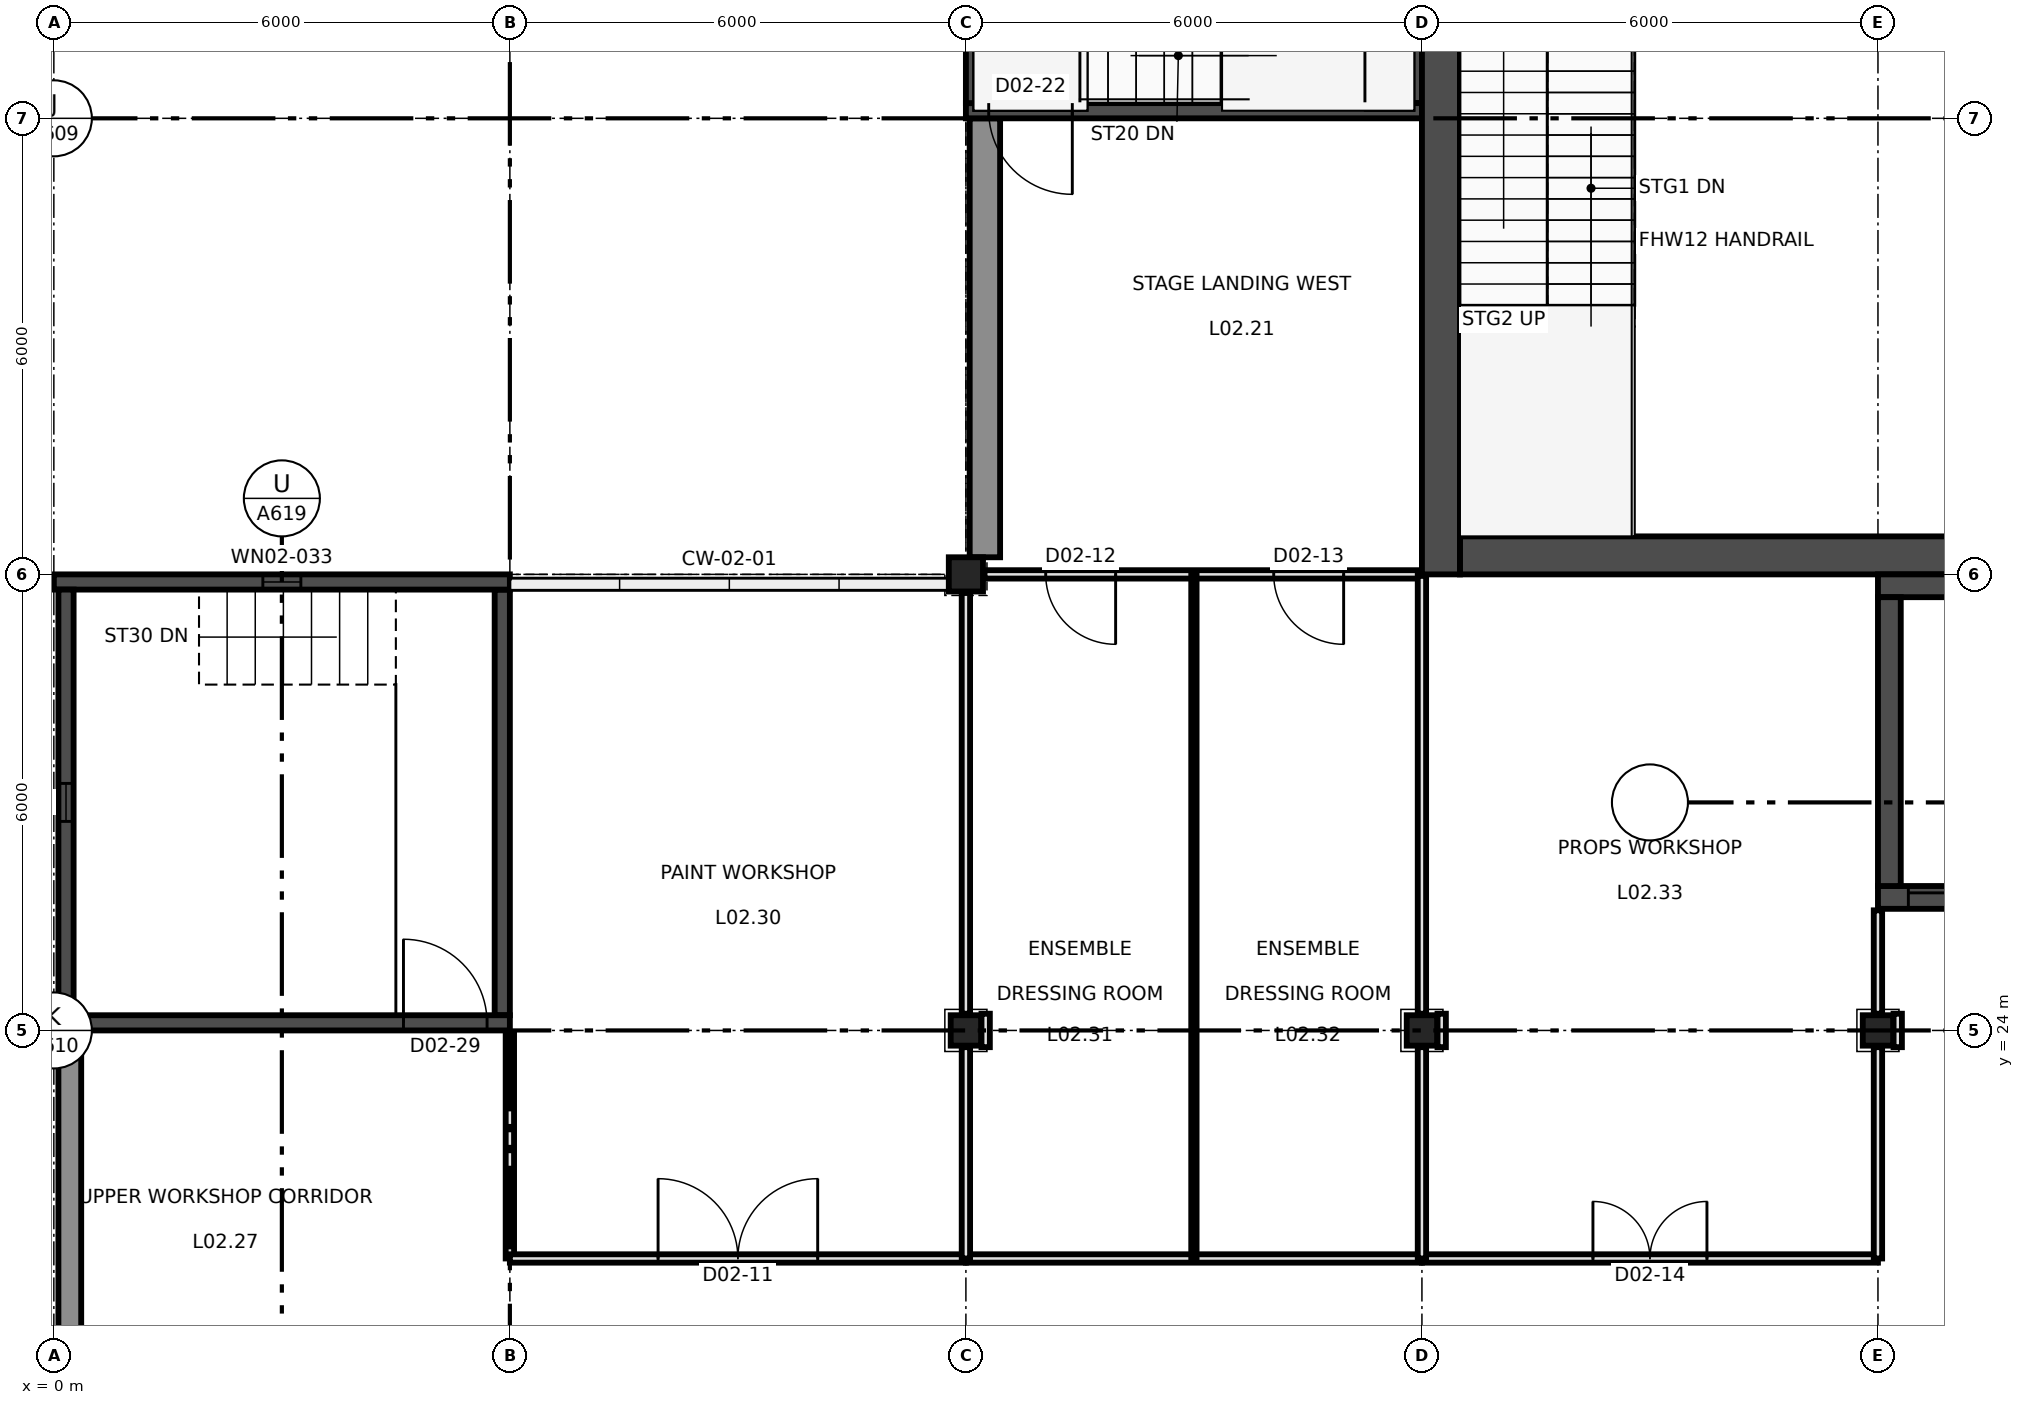
"""IFC4 building model, lengths in metres.
Left out: names, types, materials, properties, quantities, classifications, styles, units other than length and angle.
Written with IfcOpenShell. Run it as: python <this file> out.ifc"""

import sys

from ifc_helpers import new_model, si_unit, direction, frame, frame_2d, origin, origin_2d, place, context, subcontext, project, spatial, rectangle, extrude, element, fill, save


model = new_model("IFC4")
c1 = context("Model", 3, precision=1e-05, world=origin(), true_north=direction((0.0, 1.0)))
c2 = subcontext(c1, "Body", "Model", "MODEL_VIEW")
j1 = project(units=[si_unit("LENGTHUNIT", "METRE"), si_unit("PLANEANGLEUNIT", "RADIAN")], contexts=[c1])
p1 = place(None, origin())
s1 = spatial("IfcSite", under=j1, at=p1, CompositionType="ELEMENT")
p2 = place(p1, origin())
s2 = spatial("IfcBuilding", under=s1, at=p2, CompositionType="ELEMENT")
p3 = place(p2, frame((0.0, 0.0, 12.0)))
s3 = spatial("IfcBuildingStorey", under=s2, at=p3, CompositionType="ELEMENT", Elevation=12.0)
for number, where, z_axis, x_axis in (
    (1, (12.0, 24.0, 0.0), (0.0, 0.0, 1.0), (1.0, 0.0, 0.0)),
    (2, (18.0, 24.0, 0.0), (0.0, 0.0, 1.0), (1.0, 0.0, 0.0)),
    (3, (24.0, 24.0, 0.0), (0.0, 0.0, 1.0), (1.0, 0.0, 0.0)),
):
    element("IfcColumn", number, at=place(p3, frame(where, z_axis=z_axis, x_axis=x_axis)), inside=s3, PredefinedType="COLUMN", context=c2, shape_type="SweptSolid", body=[
        extrude(rectangle(XDim=0.4, YDim=0.4, at=origin_2d()), origin(), (0.0, 0.0, 1.0), 4.5),
    ])
p4 = place(p3, frame((12.0, 30.0, 0.0), z_axis=(0.0, 0.0, 1.0), x_axis=(1.0, 0.0, 0.0)))
e4 = element("IfcColumn", 4, at=p4, inside=s3, PredefinedType="COLUMN", context=c2, shape_type="SweptSolid", body=[
    extrude(rectangle(XDim=0.45, YDim=0.45, at=origin_2d()), origin(), (0.0, 0.0, 1.0), 4.5),
])
p5 = place(p3, frame((12.0, 36.1, 0.0), z_axis=(0.0, 0.0, 1.0), x_axis=(1.0, 0.0, 0.0)))
e5 = element("IfcWall", 5, at=p5, inside=s3, PredefinedType="SHEAR", context=c2, shape_type="SweptSolid", body=[
    extrude(rectangle(XDim=6.0, YDim=0.2, at=frame_2d((3.0, 0.0))), origin(), (0.0, 0.0, 1.0), 4.5),
])
p6 = place(p5, frame((0.3, 0.0, 0.0)))
e6 = element("IfcOpeningElement", 6, at=p6, cuts=e5, PredefinedType="OPENING", context=c2, shape_type="SweptSolid", body=[
    extrude(rectangle(XDim=1.1, YDim=2.2, at=frame_2d((0.55, 1.1))), frame((0.0, 0.11, 0.0), z_axis=(0.0, -1.0, 0.0), x_axis=(1.0, 0.0, 0.0)), (0.0, 0.0, 1.0), 0.22),
])
for number, where, z_axis, x_axis in (
    (7, (12.1, 36.2, 0.0), (0.0, 0.0, 1.0), (0.0, 1.0, 0.0)),
    (8, (17.9, 36.2, 0.0), (0.0, 0.0, 1.0), (0.0, 1.0, 0.0)),
):
    element("IfcWall", number, at=place(p3, frame(where, z_axis=z_axis, x_axis=x_axis)), inside=s3, PredefinedType="SHEAR", context=c2, shape_type="SweptSolid", body=[
        extrude(rectangle(XDim=5.6, YDim=0.2, at=frame_2d((2.8, 0.0))), origin(), (0.0, 0.0, 1.0), 4.5),
    ])
p7 = place(p3, frame((0.0, 29.9, 0.0), z_axis=(0.0, 0.0, 1.0), x_axis=(1.0, 0.0, 0.0)))
e9 = element("IfcWall", 9, at=p7, inside=s3, PredefinedType="SHEAR", context=c2, shape_type="SweptSolid", body=[
    extrude(rectangle(XDim=6.0, YDim=0.2, at=frame_2d((3.0, 0.0))), origin(), (0.0, 0.0, 1.0), 4.5),
])
p8 = place(p7, frame((2.75, 0.0, 0.9)))
e10 = element("IfcOpeningElement", 10, at=p8, cuts=e9, PredefinedType="OPENING", context=c2, shape_type="SweptSolid", body=[
    extrude(rectangle(XDim=0.5, YDim=2.1, at=frame_2d((0.25, 1.05))), frame((0.0, 0.11, 0.0), z_axis=(0.0, -1.0, 0.0), x_axis=(1.0, 0.0, 0.0)), (0.0, 0.0, 1.0), 0.22),
])
p9 = place(p3, frame((0.0, 24.1, 0.0), z_axis=(0.0, 0.0, 1.0), x_axis=(1.0, 0.0, 0.0)))
e11 = element("IfcWall", 11, at=p9, inside=s3, PredefinedType="SHEAR", context=c2, shape_type="SweptSolid", body=[
    extrude(rectangle(XDim=6.0, YDim=0.2, at=frame_2d((3.0, 0.0))), origin(), (0.0, 0.0, 1.0), 4.5),
])
p10 = place(p9, frame((4.6, 0.0, 0.0)))
e12 = element("IfcOpeningElement", 12, at=p10, cuts=e11, PredefinedType="OPENING", context=c2, shape_type="SweptSolid", body=[
    extrude(rectangle(XDim=1.1, YDim=2.2, at=frame_2d((0.55, 1.1))), frame((0.0, 0.11, 0.0), z_axis=(0.0, -1.0, 0.0), x_axis=(1.0, 0.0, 0.0)), (0.0, 0.0, 1.0), 0.22),
])
p11 = place(p3, frame((0.16, 24.2, 0.0), z_axis=(0.0, 0.0, 1.0), x_axis=(0.0, 1.0, 0.0)))
e13 = element("IfcWall", 13, at=p11, inside=s3, PredefinedType="SHEAR", context=c2, shape_type="SweptSolid", body=[
    extrude(rectangle(XDim=5.6, YDim=0.2, at=frame_2d((2.8, 0.0))), origin(), (0.0, 0.0, 1.0), 4.5),
])
p12 = place(p11, frame((2.55, 0.0, 0.9)))
e14 = element("IfcOpeningElement", 14, at=p12, cuts=e13, PredefinedType="OPENING", context=c2, shape_type="SweptSolid", body=[
    extrude(rectangle(XDim=0.5, YDim=2.1, at=frame_2d((0.25, 1.05))), frame((0.0, 0.11, 0.0), z_axis=(0.0, -1.0, 0.0), x_axis=(1.0, 0.0, 0.0)), (0.0, 0.0, 1.0), 0.22),
])
p13 = place(p3, frame((5.9, 24.2, 0.0), z_axis=(0.0, 0.0, 1.0), x_axis=(0.0, 1.0, 0.0)))
e15 = element("IfcWall", 15, at=p13, inside=s3, PredefinedType="SHEAR", context=c2, shape_type="SweptSolid", body=[
    extrude(rectangle(XDim=5.6, YDim=0.2, at=frame_2d((2.8, 0.0))), origin(), (0.0, 0.0, 1.0), 4.5),
])
p14 = place(p3, frame((24.0, 29.85, 0.0), z_axis=(0.0, 0.0, 1.0), x_axis=(1.0, 0.0, 0.0)))
e16 = element("IfcWall", 16, at=p14, inside=s3, PredefinedType="SHEAR", context=c2, shape_type="SweptSolid", body=[
    extrude(rectangle(XDim=3.2, YDim=0.3, at=frame_2d((1.6, 0.0))), origin(), (0.0, 0.0, 1.0), 4.5),
])
p15 = place(p3, frame((24.0, 25.75, 0.0), z_axis=(0.0, 0.0, 1.0), x_axis=(1.0, 0.0, 0.0)))
e17 = element("IfcWall", 17, at=p15, inside=s3, PredefinedType="SHEAR", context=c2, shape_type="SweptSolid", body=[
    extrude(rectangle(XDim=3.2, YDim=0.3, at=frame_2d((1.6, 0.0))), origin(), (0.0, 0.0, 1.0), 4.5),
])
p16 = place(p15, frame((0.4, 0.0, 0.0)))
e18 = element("IfcOpeningElement", 18, at=p16, cuts=e17, PredefinedType="OPENING", context=c2, shape_type="SweptSolid", body=[
    extrude(rectangle(XDim=2.4, YDim=2.4, at=frame_2d((1.2, 1.2))), frame((0.0, 0.16, 0.0), z_axis=(0.0, -1.0, 0.0), x_axis=(1.0, 0.0, 0.0)), (0.0, 0.0, 1.0), 0.32),
])
p17 = place(p3, frame((24.15, 25.9, 0.0), z_axis=(0.0, 0.0, 1.0), x_axis=(0.0, 1.0, 0.0)))
e19 = element("IfcWall", 19, at=p17, inside=s3, PredefinedType="SHEAR", context=c2, shape_type="SweptSolid", body=[
    extrude(rectangle(XDim=3.8, YDim=0.3, at=frame_2d((1.9, 0.0))), origin(), (0.0, 0.0, 1.0), 4.5),
])
p18 = place(p3, frame((0.21, 6.0, 0.0), z_axis=(0.0, 0.0, 1.0), x_axis=(0.0, 1.0, 0.0)))
e20 = element("IfcWall", 20, at=p18, inside=s3, PredefinedType="SOLIDWALL", context=c2, shape_type="SweptSolid", body=[
    extrude(rectangle(XDim=18.0, YDim=0.3, at=frame_2d((9.0, 0.0))), origin(), (0.0, 0.0, 1.0), 4.5),
])
p19 = place(p3, frame((18.25, 30.0, 0.0), z_axis=(0.0, 0.0, 1.0), x_axis=(0.0, 1.0, 0.0)))
e21 = element("IfcWall", 21, at=p19, inside=s3, PredefinedType="SHEAR", context=c2, shape_type="SweptSolid", body=[
    extrude(rectangle(XDim=24.0, YDim=0.5, at=frame_2d((12.0, 0.0))), origin(), (0.0, 0.0, 1.0), 4.5),
])
p20 = place(p3, frame((18.5, 30.25, 0.0), z_axis=(0.0, 0.0, 1.0), x_axis=(1.0, 0.0, 0.0)))
e22 = element("IfcWall", 22, at=p20, inside=s3, PredefinedType="SHEAR", context=c2, shape_type="SweptSolid", body=[
    extrude(rectangle(XDim=29.0, YDim=0.5, at=frame_2d((14.5, 0.0))), origin(), (0.0, 0.0, 1.0), 4.5),
])
p21 = place(p3, frame((12.25, 30.225, 0.0), z_axis=(0.0, 0.0, 1.0), x_axis=(0.0, 1.0, 0.0)))
e23 = element("IfcWall", 23, at=p21, inside=s3, PredefinedType="SOLIDWALL", context=c2, shape_type="SweptSolid", body=[
    extrude(rectangle(XDim=5.775, YDim=0.4, at=frame_2d((2.887, 0.0))), origin(), (0.0, 0.0, 1.0), 3.55),
])
p22 = place(p3, frame((12.245, 30.0, 0.0), z_axis=(0.0, 0.0, 1.0), x_axis=(1.0, 0.0, 0.0)))
e24 = element("IfcWall", 24, at=p22, inside=s3, PredefinedType="PARTITIONING", context=c2, shape_type="SweptSolid", body=[
    extrude(rectangle(XDim=5.735, YDim=0.11, at=frame_2d((2.867, 0.0))), origin(), (0.0, 0.0, 1.0), 3.55),
])
p23 = place(p22, frame((0.805, 0.0, 0.0)))
e25 = element("IfcOpeningElement", 25, at=p23, cuts=e24, PredefinedType="OPENING", context=c2, shape_type="SweptSolid", body=[
    extrude(rectangle(XDim=0.92, YDim=2.04, at=frame_2d((0.46, 1.02))), frame((0.0, 0.065, 0.0), z_axis=(0.0, -1.0, 0.0), x_axis=(1.0, 0.0, 0.0)), (0.0, 0.0, 1.0), 0.13),
])
p24 = place(p22, frame((3.805, 0.0, 0.0)))
e26 = element("IfcOpeningElement", 26, at=p24, cuts=e24, PredefinedType="OPENING", context=c2, shape_type="SweptSolid", body=[
    extrude(rectangle(XDim=0.92, YDim=2.04, at=frame_2d((0.46, 1.02))), frame((0.0, 0.065, 0.0), z_axis=(0.0, -1.0, 0.0), x_axis=(1.0, 0.0, 0.0)), (0.0, 0.0, 1.0), 0.13),
])
p25 = place(p3, frame((6.0, 21.0, 0.0), z_axis=(0.0, 0.0, 1.0), x_axis=(0.0, 1.0, 0.0)))
e27 = element("IfcWall", 27, at=p25, inside=s3, PredefinedType="PARTITIONING", context=c2, shape_type="SweptSolid", body=[
    extrude(rectangle(XDim=2.98, YDim=0.11, at=frame_2d((1.49, 0.0))), origin(), (0.0, 0.0, 1.0), 3.9),
])
p26 = place(p3, frame((6.0, 21.0, 0.0), z_axis=(0.0, 0.0, 1.0), x_axis=(1.0, 0.0, 0.0)))
e28 = element("IfcWall", 28, at=p26, inside=s3, PredefinedType="PARTITIONING", context=c2, shape_type="SweptSolid", body=[
    extrude(rectangle(XDim=6.0, YDim=0.11, at=frame_2d((3.0, 0.0))), origin(), (0.0, 0.0, 1.0), 3.9),
])
p27 = place(p26, frame((1.95, 0.0, 0.0)))
e29 = element("IfcOpeningElement", 29, at=p27, cuts=e28, PredefinedType="OPENING", context=c2, shape_type="SweptSolid", body=[
    extrude(rectangle(XDim=2.1, YDim=2.4, at=frame_2d((1.05, 1.2))), frame((0.0, 0.065, 0.0), z_axis=(0.0, -1.0, 0.0), x_axis=(1.0, 0.0, 0.0)), (0.0, 0.0, 1.0), 0.13),
])
p28 = place(p3, frame((12.0, 21.0, 0.0), z_axis=(0.0, 0.0, 1.0), x_axis=(1.0, 0.0, 0.0)))
e30 = element("IfcWall", 30, at=p28, inside=s3, PredefinedType="PARTITIONING", context=c2, shape_type="SweptSolid", body=[
    extrude(rectangle(XDim=6.0, YDim=0.11, at=frame_2d((3.0, 0.0))), origin(), (0.0, 0.0, 1.0), 4.28),
])
p29 = place(p3, frame((12.0, 24.22, 0.0), z_axis=(0.0, 0.0, 1.0), x_axis=(0.0, 1.0, 0.0)))
e31 = element("IfcWall", 31, at=p29, inside=s3, PredefinedType="PARTITIONING", context=c2, shape_type="SweptSolid", body=[
    extrude(rectangle(XDim=5.535, YDim=0.11, at=frame_2d((2.768, 0.0))), origin(), (0.0, 0.0, 1.0), 4.28),
])
p30 = place(p3, frame((12.0, 21.0, 0.0), z_axis=(0.0, 0.0, 1.0), x_axis=(0.0, 1.0, 0.0)))
e32 = element("IfcWall", 32, at=p30, inside=s3, PredefinedType="PARTITIONING", context=c2, shape_type="SweptSolid", body=[
    extrude(rectangle(XDim=2.78, YDim=0.11, at=frame_2d((1.39, 0.0))), origin(), (0.0, 0.0, 1.0), 4.28),
])
p31 = place(p3, frame((12.26, 23.78, 0.0), z_axis=(0.0, 0.0, 1.0), x_axis=(0.0, 1.0, 0.0)))
e33 = element("IfcWall", 33, at=p31, inside=s3, PredefinedType="PARTITIONING", context=c2, shape_type="SweptSolid", body=[
    extrude(rectangle(XDim=0.44, YDim=0.11, at=frame_2d((0.22, 0.0))), origin(), (0.0, 0.0, 1.0), 4.28),
])
p32 = place(p3, frame((18.0, 21.0, 0.0), z_axis=(0.0, 0.0, 1.0), x_axis=(1.0, 0.0, 0.0)))
e34 = element("IfcWall", 34, at=p32, inside=s3, PredefinedType="PARTITIONING", context=c2, shape_type="SweptSolid", body=[
    extrude(rectangle(XDim=6.0, YDim=0.11, at=frame_2d((3.0, 0.0))), origin(), (0.0, 0.0, 1.0), 4.28),
])
p33 = place(p32, frame((2.25, 0.0, 0.0)))
e35 = element("IfcOpeningElement", 35, at=p33, cuts=e34, PredefinedType="OPENING", context=c2, shape_type="SweptSolid", body=[
    extrude(rectangle(XDim=1.5, YDim=2.1, at=frame_2d((0.75, 1.05))), frame((0.0, 0.065, 0.0), z_axis=(0.0, -1.0, 0.0), x_axis=(1.0, 0.0, 0.0)), (0.0, 0.0, 1.0), 0.13),
])
p34 = place(p3, frame((24.0, 21.0, 0.0), z_axis=(0.0, 0.0, 1.0), x_axis=(0.0, 1.0, 0.0)))
e36 = element("IfcWall", 36, at=p34, inside=s3, PredefinedType="PARTITIONING", context=c2, shape_type="SweptSolid", body=[
    extrude(rectangle(XDim=2.78, YDim=0.11, at=frame_2d((1.39, 0.0))), origin(), (0.0, 0.0, 1.0), 4.28),
])
p35 = place(p3, frame((24.0, 24.22, 0.0), z_axis=(0.0, 0.0, 1.0), x_axis=(0.0, 1.0, 0.0)))
e37 = element("IfcWall", 37, at=p35, inside=s3, PredefinedType="PARTITIONING", context=c2, shape_type="SweptSolid", body=[
    extrude(rectangle(XDim=1.36, YDim=0.11, at=frame_2d((0.68, 0.0))), origin(), (0.0, 0.0, 1.0), 4.28),
])
p36 = place(p3, frame((24.26, 23.78, 0.0), z_axis=(0.0, 0.0, 1.0), x_axis=(0.0, 1.0, 0.0)))
e38 = element("IfcWall", 38, at=p36, inside=s3, PredefinedType="PARTITIONING", context=c2, shape_type="SweptSolid", body=[
    extrude(rectangle(XDim=0.44, YDim=0.11, at=frame_2d((0.22, 0.0))), origin(), (0.0, 0.0, 1.0), 4.28),
])
p37 = place(p3, frame((18.0, 24.22, 0.0), z_axis=(0.0, 0.0, 1.0), x_axis=(0.0, 1.0, 0.0)))
e39 = element("IfcWall", 39, at=p37, inside=s3, PredefinedType="PARTITIONING", context=c2, shape_type="SweptSolid", body=[
    extrude(rectangle(XDim=5.76, YDim=0.11, at=frame_2d((2.88, 0.0))), origin(), (0.0, 0.0, 1.0), 3.55),
])
p38 = place(p3, frame((18.0, 21.0, 0.0), z_axis=(0.0, 0.0, 1.0), x_axis=(0.0, 1.0, 0.0)))
e40 = element("IfcWall", 40, at=p38, inside=s3, PredefinedType="PARTITIONING", context=c2, shape_type="SweptSolid", body=[
    extrude(rectangle(XDim=2.78, YDim=0.11, at=frame_2d((1.39, 0.0))), origin(), (0.0, 0.0, 1.0), 4.28),
])
p39 = place(p3, frame((18.26, 23.78, 0.0), z_axis=(0.0, 0.0, 1.0), x_axis=(0.0, 1.0, 0.0)))
e41 = element("IfcWall", 41, at=p39, inside=s3, PredefinedType="PARTITIONING", context=c2, shape_type="SweptSolid", body=[
    extrude(rectangle(XDim=0.44, YDim=0.11, at=frame_2d((0.22, 0.0))), origin(), (0.0, 0.0, 1.0), 4.28),
])
p40 = place(p3, frame((15.0, 21.0, 0.0), z_axis=(0.0, 0.0, 1.0), x_axis=(0.0, 1.0, 0.0)))
e42 = element("IfcWall", 42, at=p40, inside=s3, PredefinedType="PARTITIONING", context=c2, shape_type="SweptSolid", body=[
    extrude(rectangle(XDim=9.0, YDim=0.07, at=frame_2d((4.5, 0.0))), origin(), (0.0, 0.0, 1.0), 3.55),
])
p41 = place(p8, origin())
e43 = element("IfcWindow", 43, at=p41, inside=s3, PartitioningType="SINGLE_PANEL", PredefinedType="WINDOW", context=c2, shape_type="SweptSolid", body=[
    extrude(rectangle(XDim=0.5, YDim=2.1, at=frame_2d((0.25, 1.05))), frame((0.0, 0.03, 0.0), z_axis=(0.0, -1.0, 0.0), x_axis=(1.0, 0.0, 0.0)), (0.0, 0.0, 1.0), 0.06),
])
fill(e10, e43)
p42 = place(p12, origin())
e44 = element("IfcWindow", 44, at=p42, inside=s3, PartitioningType="SINGLE_PANEL", PredefinedType="WINDOW", context=c2, shape_type="SweptSolid", body=[
    extrude(rectangle(XDim=0.5, YDim=2.1, at=frame_2d((0.25, 1.05))), frame((0.0, 0.03, 0.0), z_axis=(0.0, -1.0, 0.0), x_axis=(1.0, 0.0, 0.0)), (0.0, 0.0, 1.0), 0.06),
])
fill(e14, e44)
p43 = place(p27, origin())
e45 = element("IfcDoor", 45, at=p43, inside=s3, OperationType="DOUBLE_DOOR_SINGLE_SWING", PredefinedType="DOOR", context=c2, shape_type="SweptSolid", body=[
    extrude(rectangle(XDim=2.1, YDim=2.4, at=frame_2d((1.05, 1.2))), frame((0.0, 0.025, 0.0), z_axis=(0.0, -1.0, 0.0), x_axis=(1.0, 0.0, 0.0)), (0.0, 0.0, 1.0), 0.05),
])
fill(e29, e45)
p44 = place(p23, frame((0.92, 0.0, 0.0), z_axis=(0.0, 0.0, 1.0), x_axis=(-1.0, 0.0, 0.0)))
e46 = element("IfcDoor", 46, at=p44, inside=s3, OperationType="SINGLE_SWING_RIGHT", PredefinedType="DOOR", context=c2, shape_type="SweptSolid", body=[
    extrude(rectangle(XDim=0.92, YDim=2.04, at=frame_2d((0.46, 1.02))), frame((0.0, 0.025, 0.0), z_axis=(0.0, -1.0, 0.0), x_axis=(1.0, 0.0, 0.0)), (0.0, 0.0, 1.0), 0.05),
])
fill(e25, e46)
p45 = place(p24, frame((0.92, 0.0, 0.0), z_axis=(0.0, 0.0, 1.0), x_axis=(-1.0, 0.0, 0.0)))
e47 = element("IfcDoor", 47, at=p45, inside=s3, OperationType="SINGLE_SWING_RIGHT", PredefinedType="DOOR", context=c2, shape_type="SweptSolid", body=[
    extrude(rectangle(XDim=0.92, YDim=2.04, at=frame_2d((0.46, 1.02))), frame((0.0, 0.025, 0.0), z_axis=(0.0, -1.0, 0.0), x_axis=(1.0, 0.0, 0.0)), (0.0, 0.0, 1.0), 0.05),
])
fill(e26, e47)
p46 = place(p33, origin())
e48 = element("IfcDoor", 48, at=p46, inside=s3, OperationType="DOUBLE_DOOR_SINGLE_SWING", PredefinedType="DOOR", context=c2, shape_type="SweptSolid", body=[
    extrude(rectangle(XDim=1.5, YDim=2.1, at=frame_2d((0.75, 1.05))), frame((0.0, 0.025, 0.0), z_axis=(0.0, -1.0, 0.0), x_axis=(1.0, 0.0, 0.0)), (0.0, 0.0, 1.0), 0.05),
])
fill(e35, e48)
p47 = place(p6, origin())
e49 = element("IfcDoor", 49, at=p47, inside=s3, OperationType="SINGLE_SWING_RIGHT", PredefinedType="DOOR", context=c2, shape_type="SweptSolid", body=[
    extrude(rectangle(XDim=1.1, YDim=2.2, at=frame_2d((0.55, 1.1))), frame((0.0, 0.025, 0.0), z_axis=(0.0, -1.0, 0.0), x_axis=(1.0, 0.0, 0.0)), (0.0, 0.0, 1.0), 0.05),
])
fill(e6, e49)
p48 = place(p10, origin())
e50 = element("IfcDoor", 50, at=p48, inside=s3, OperationType="SINGLE_SWING_LEFT", PredefinedType="DOOR", context=c2, shape_type="SweptSolid", body=[
    extrude(rectangle(XDim=1.1, YDim=2.2, at=frame_2d((0.55, 1.1))), frame((0.0, 0.025, 0.0), z_axis=(0.0, -1.0, 0.0), x_axis=(1.0, 0.0, 0.0)), (0.0, 0.0, 1.0), 0.05),
])
fill(e12, e50)
p49 = place(p16, origin())
e51 = element("IfcDoor", 51, at=p49, inside=s3, OperationType="DOUBLE_DOOR_SLIDING", PredefinedType="DOOR", context=c2, shape_type="SweptSolid", body=[
    extrude(rectangle(XDim=2.4, YDim=2.4, at=frame_2d((1.2, 1.2))), frame((0.0, 0.025, 0.0), z_axis=(0.0, -1.0, 0.0), x_axis=(1.0, 0.0, 0.0)), (0.0, 0.0, 1.0), 0.05),
])
fill(e18, e51)
save(model, sys.argv[1])
